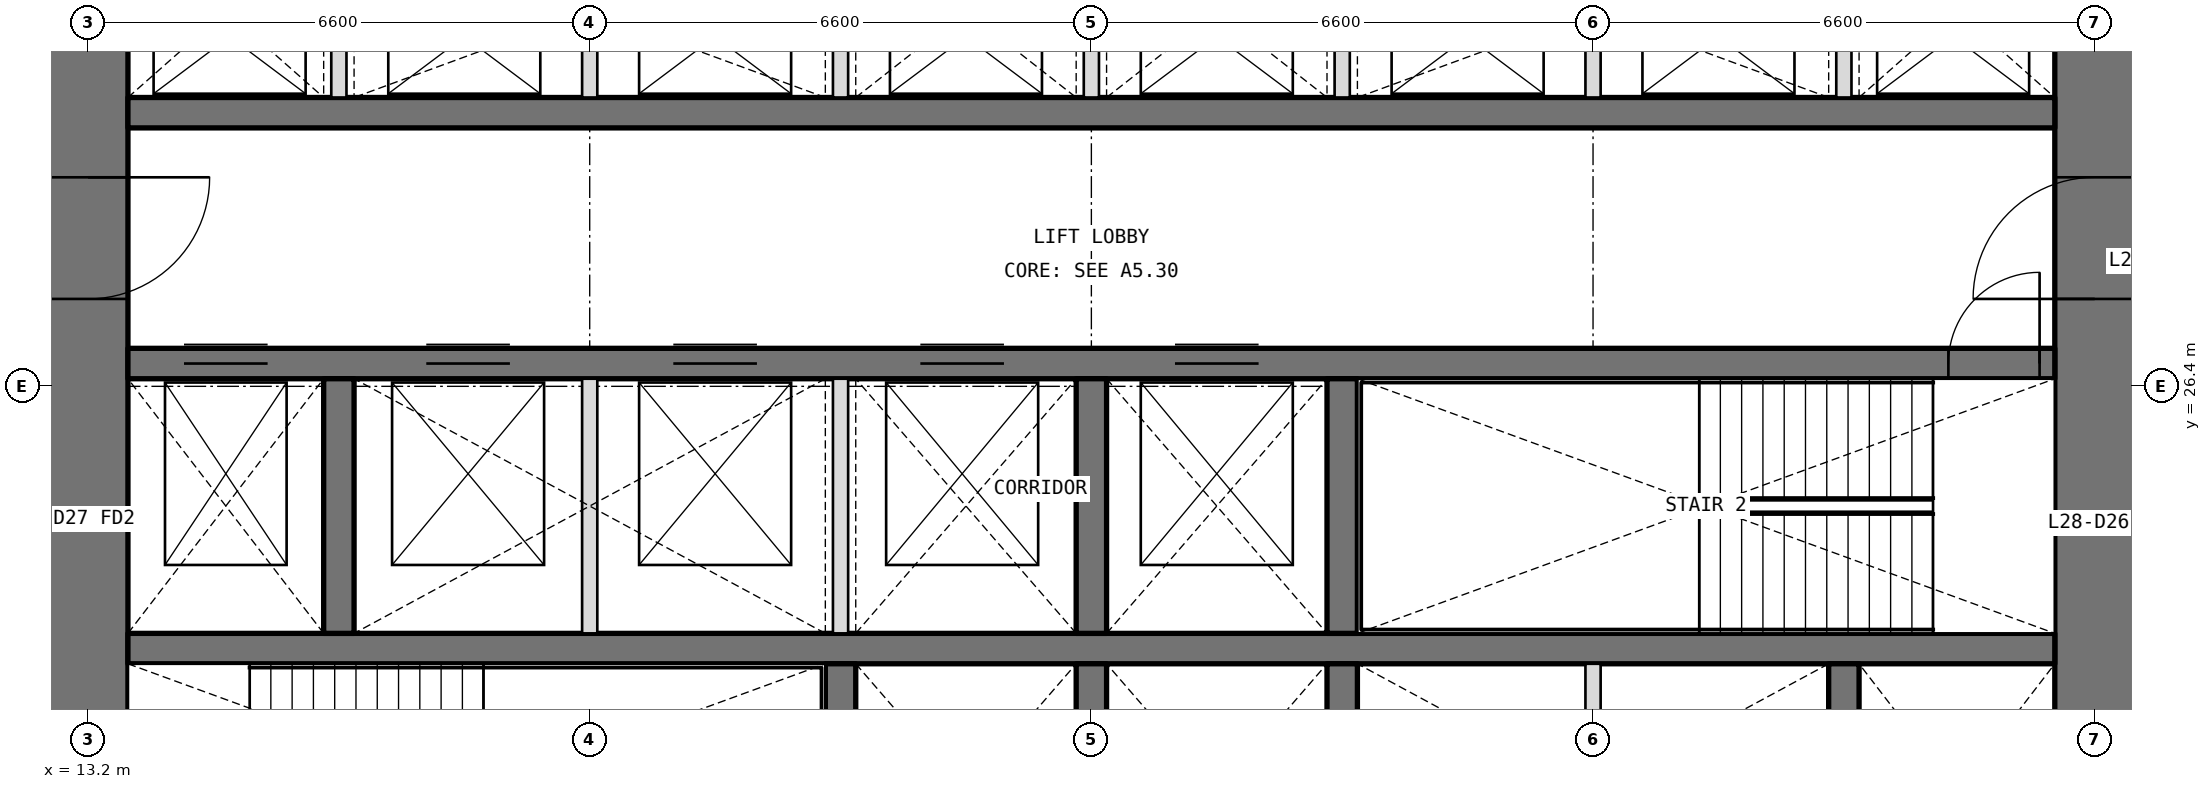
"""IFC4 building model, lengths in metres.
Left out: names, types, materials, properties, quantities, classifications, styles, units other than length and angle.
Written with IfcOpenShell. Run it as: python <this file> out.ifc"""

import sys

from ifc_helpers import new_model, si_unit, direction, frame, frame_2d, origin, place, context, subcontext, project, spatial, rectangle, extrude, element, fill, save


model = new_model("IFC4")
c1 = context("Model", 3, precision=1e-05, world=origin(), true_north=direction((0.0, 1.0)))
c2 = subcontext(c1, "Body", "Model", "MODEL_VIEW")
j1 = project(units=[si_unit("LENGTHUNIT", "METRE"), si_unit("PLANEANGLEUNIT", "RADIAN")], contexts=[c1])
p1 = place(None, origin())
s1 = spatial("IfcSite", under=j1, at=p1, CompositionType="ELEMENT")
p2 = place(p1, origin())
s2 = spatial("IfcBuilding", under=s1, at=p2, CompositionType="ELEMENT")
p3 = place(p2, frame((0.0, 0.0, 124.2)))
s3 = spatial("IfcBuildingStorey", under=s2, at=p3, CompositionType="ELEMENT", Elevation=124.2)
p4 = place(p3, frame((39.6, 13.725, 0.0), z_axis=(0.0, 0.0, 1.0), x_axis=(0.0, 1.0, 0.0)))
e1 = element("IfcWall", 1, at=p4, inside=s3, PredefinedType="SHEAR", context=c2, shape_type="SweptSolid", body=[
    extrude(rectangle(XDim=18.75, YDim=1.05, at=frame_2d((9.375, 0.0))), origin(), (0.0, 0.0, 1.0), 4.2),
])
p5 = place(p4, frame((3.025, 0.0, 0.0)))
e2 = element("IfcOpeningElement", 2, at=p5, cuts=e1, PredefinedType="OPENING", context=c2, shape_type="SweptSolid", body=[
    extrude(rectangle(XDim=1.6, YDim=2.1, at=frame_2d((0.8, 1.05))), frame((0.0, 0.535, 0.0), z_axis=(0.0, -1.0, 0.0), x_axis=(1.0, 0.0, 0.0)), (0.0, 0.0, 1.0), 1.07),
])
p6 = place(p4, frame((13.825, 0.0, 0.0)))
e3 = element("IfcOpeningElement", 3, at=p6, cuts=e1, PredefinedType="OPENING", context=c2, shape_type="SweptSolid", body=[
    extrude(rectangle(XDim=1.6, YDim=2.1, at=frame_2d((0.8, 1.05))), frame((0.0, 0.535, 0.0), z_axis=(0.0, -1.0, 0.0), x_axis=(1.0, 0.0, 0.0)), (0.0, 0.0, 1.0), 1.07),
])
p7 = place(p3, frame((13.2, 32.475, 0.0), z_axis=(0.0, 0.0, 1.0), x_axis=(0.0, -1.0, 0.0)))
e4 = element("IfcWall", 4, at=p7, inside=s3, PredefinedType="SHEAR", context=c2, shape_type="SweptSolid", body=[
    extrude(rectangle(XDim=18.75, YDim=1.05, at=frame_2d((9.375, 0.0))), origin(), (0.0, 0.0, 1.0), 4.2),
])
p8 = place(p7, frame((14.125, 0.0, 0.0)))
e5 = element("IfcOpeningElement", 5, at=p8, cuts=e4, PredefinedType="OPENING", context=c2, shape_type="SweptSolid", body=[
    extrude(rectangle(XDim=1.6, YDim=2.1, at=frame_2d((0.8, 1.05))), frame((0.0, 0.535, 0.0), z_axis=(0.0, -1.0, 0.0), x_axis=(1.0, 0.0, 0.0)), (0.0, 0.0, 1.0), 1.07),
])
p9 = place(p7, frame((3.325, 0.0, 0.0)))
e6 = element("IfcOpeningElement", 6, at=p9, cuts=e4, PredefinedType="OPENING", context=c2, shape_type="SweptSolid", body=[
    extrude(rectangle(XDim=1.6, YDim=2.1, at=frame_2d((0.8, 1.05))), frame((0.0, 0.535, 0.0), z_axis=(0.0, -1.0, 0.0), x_axis=(1.0, 0.0, 0.0)), (0.0, 0.0, 1.0), 1.07),
])
p10 = place(p3, frame((13.725, 22.95, 0.0), z_axis=(0.0, 0.0, 1.0), x_axis=(1.0, 0.0, 0.0)))
e7 = element("IfcWall", 7, at=p10, inside=s3, PredefinedType="SHEAR", context=c2, shape_type="SweptSolid", body=[
    extrude(rectangle(XDim=25.35, YDim=0.4, at=frame_2d((12.675, 0.0))), origin(), (0.0, 0.0, 1.0), 4.2),
])
p11 = place(p3, frame((13.725, 26.7, 0.0), z_axis=(0.0, 0.0, 1.0), x_axis=(1.0, 0.0, 0.0)))
e8 = element("IfcWall", 8, at=p11, inside=s3, PredefinedType="SHEAR", context=c2, shape_type="SweptSolid", body=[
    extrude(rectangle(XDim=25.35, YDim=0.4, at=frame_2d((12.675, 0.0))), origin(), (0.0, 0.0, 1.0), 4.2),
])
p12 = place(p11, frame((23.95, 0.0, 0.0)))
e9 = element("IfcOpeningElement", 9, at=p12, cuts=e8, PredefinedType="OPENING", context=c2, shape_type="SweptSolid", body=[
    extrude(rectangle(XDim=1.2, YDim=2.1, at=frame_2d((0.6, 1.05))), frame((0.0, 0.21, 0.0), z_axis=(0.0, -1.0, 0.0), x_axis=(1.0, 0.0, 0.0)), (0.0, 0.0, 1.0), 0.42),
])
p13 = place(p11, frame((0.738, 0.0, 0.0)))
e10 = element("IfcOpeningElement", 10, at=p13, cuts=e8, PredefinedType="OPENING", context=c2, shape_type="SweptSolid", body=[
    extrude(rectangle(XDim=1.1, YDim=2.1, at=frame_2d((0.55, 1.05))), frame((0.0, 0.21, 0.0), z_axis=(0.0, -1.0, 0.0), x_axis=(1.0, 0.0, 0.0)), (0.0, 0.0, 1.0), 0.42),
])
p14 = place(p11, frame((3.925, 0.0, 0.0)))
e11 = element("IfcOpeningElement", 11, at=p14, cuts=e8, PredefinedType="OPENING", context=c2, shape_type="SweptSolid", body=[
    extrude(rectangle(XDim=1.1, YDim=2.1, at=frame_2d((0.55, 1.05))), frame((0.0, 0.21, 0.0), z_axis=(0.0, -1.0, 0.0), x_axis=(1.0, 0.0, 0.0)), (0.0, 0.0, 1.0), 0.42),
])
p15 = place(p11, frame((7.175, 0.0, 0.0)))
e12 = element("IfcOpeningElement", 12, at=p15, cuts=e8, PredefinedType="OPENING", context=c2, shape_type="SweptSolid", body=[
    extrude(rectangle(XDim=1.1, YDim=2.1, at=frame_2d((0.55, 1.05))), frame((0.0, 0.21, 0.0), z_axis=(0.0, -1.0, 0.0), x_axis=(1.0, 0.0, 0.0)), (0.0, 0.0, 1.0), 0.42),
])
p16 = place(p11, frame((10.425, 0.0, 0.0)))
e13 = element("IfcOpeningElement", 13, at=p16, cuts=e8, PredefinedType="OPENING", context=c2, shape_type="SweptSolid", body=[
    extrude(rectangle(XDim=1.1, YDim=2.1, at=frame_2d((0.55, 1.05))), frame((0.0, 0.21, 0.0), z_axis=(0.0, -1.0, 0.0), x_axis=(1.0, 0.0, 0.0)), (0.0, 0.0, 1.0), 0.42),
])
p17 = place(p11, frame((13.775, 0.0, 0.0)))
e14 = element("IfcOpeningElement", 14, at=p17, cuts=e8, PredefinedType="OPENING", context=c2, shape_type="SweptSolid", body=[
    extrude(rectangle(XDim=1.1, YDim=2.1, at=frame_2d((0.55, 1.05))), frame((0.0, 0.21, 0.0), z_axis=(0.0, -1.0, 0.0), x_axis=(1.0, 0.0, 0.0)), (0.0, 0.0, 1.0), 0.42),
])
p18 = place(p3, frame((13.725, 30.0, 0.0), z_axis=(0.0, 0.0, 1.0), x_axis=(1.0, 0.0, 0.0)))
e15 = element("IfcWall", 15, at=p18, inside=s3, PredefinedType="SHEAR", context=c2, shape_type="SweptSolid", body=[
    extrude(rectangle(XDim=25.35, YDim=0.4, at=frame_2d((12.675, 0.0))), origin(), (0.0, 0.0, 1.0), 4.2),
])
for number, where, z_axis, x_axis in (
    (16, (23.1, 19.4, 0.0), (0.0, 0.0, 1.0), (0.0, 1.0, 0.0)),
    (17, (26.4, 19.4, 0.0), (0.0, 0.0, 1.0), (0.0, 1.0, 0.0)),
    (18, (29.7, 19.4, 0.0), (0.0, 0.0, 1.0), (0.0, 1.0, 0.0)),
    (19, (36.3, 19.4, 0.0), (0.0, 0.0, 1.0), (0.0, 1.0, 0.0)),
    (20, (16.5, 23.15, 0.0), (0.0, 0.0, 1.0), (0.0, 1.0, 0.0)),
    (21, (26.4, 23.15, 0.0), (0.0, 0.0, 1.0), (0.0, 1.0, 0.0)),
    (22, (29.7, 23.15, 0.0), (0.0, 0.0, 1.0), (0.0, 1.0, 0.0)),
):
    element("IfcWall", number, at=place(p3, frame(where, z_axis=z_axis, x_axis=x_axis)), inside=s3, PredefinedType="SHEAR", context=c2, shape_type="SweptSolid", body=[
        extrude(rectangle(XDim=3.35, YDim=0.4, at=frame_2d((1.675, 0.0))), origin(), (0.0, 0.0, 1.0), 4.2),
    ])
for number, where, z_axis, x_axis in (
    (23, (16.5, 30.2, 0.0), (0.0, 0.0, 1.0), (0.0, 1.0, 0.0)),
    (24, (19.8, 30.2, 0.0), (0.0, 0.0, 1.0), (0.0, 1.0, 0.0)),
    (25, (23.1, 30.2, 0.0), (0.0, 0.0, 1.0), (0.0, 1.0, 0.0)),
    (26, (26.4, 30.2, 0.0), (0.0, 0.0, 1.0), (0.0, 1.0, 0.0)),
    (27, (29.7, 30.2, 0.0), (0.0, 0.0, 1.0), (0.0, 1.0, 0.0)),
    (28, (33.0, 30.2, 0.0), (0.0, 0.0, 1.0), (0.0, 1.0, 0.0)),
    (29, (36.3, 30.2, 0.0), (0.0, 0.0, 1.0), (0.0, 1.0, 0.0)),
):
    element("IfcWall", number, at=place(p3, frame(where, z_axis=z_axis, x_axis=x_axis)), inside=s3, PredefinedType="PARTITIONING", context=c2, shape_type="SweptSolid", body=[
        extrude(rectangle(XDim=2.275, YDim=0.2, at=frame_2d((1.138, 0.0))), origin(), (0.0, 0.0, 1.0), 4.2),
    ])
for number, where, z_axis, x_axis in (
    (30, (33.0, 19.4, 0.0), (0.0, 0.0, 1.0), (0.0, 1.0, 0.0)),
    (31, (19.8, 23.15, 0.0), (0.0, 0.0, 1.0), (0.0, 1.0, 0.0)),
    (32, (23.1, 23.15, 0.0), (0.0, 0.0, 1.0), (0.0, 1.0, 0.0)),
):
    element("IfcWall", number, at=place(p3, frame(where, z_axis=z_axis, x_axis=x_axis)), inside=s3, PredefinedType="PARTITIONING", context=c2, shape_type="SweptSolid", body=[
        extrude(rectangle(XDim=3.35, YDim=0.2, at=frame_2d((1.675, 0.0))), origin(), (0.0, 0.0, 1.0), 4.2),
    ])
p19 = place(p12, origin())
e33 = element("IfcDoor", 33, at=p19, inside=s3, OperationType="SINGLE_SWING_RIGHT", PredefinedType="DOOR", context=c2, shape_type="SweptSolid", body=[
    extrude(rectangle(XDim=1.2, YDim=2.1, at=frame_2d((0.6, 1.05))), frame((0.0, 0.025, 0.0), z_axis=(0.0, -1.0, 0.0), x_axis=(1.0, 0.0, 0.0)), (0.0, 0.0, 1.0), 0.05),
])
fill(e9, e33)
p20 = place(p9, origin())
e34 = element("IfcDoor", 34, at=p20, inside=s3, OperationType="DOUBLE_DOOR_DOUBLE_SWING", PredefinedType="DOOR", context=c2, shape_type="SweptSolid", body=[
    extrude(rectangle(XDim=1.6, YDim=2.1, at=frame_2d((0.8, 1.05))), frame((0.0, 0.025, 0.0), z_axis=(0.0, -1.0, 0.0), x_axis=(1.0, 0.0, 0.0)), (0.0, 0.0, 1.0), 0.05),
])
fill(e6, e34)
p21 = place(p6, origin())
e35 = element("IfcDoor", 35, at=p21, inside=s3, OperationType="DOUBLE_DOOR_DOUBLE_SWING", PredefinedType="DOOR", context=c2, shape_type="SweptSolid", body=[
    extrude(rectangle(XDim=1.6, YDim=2.1, at=frame_2d((0.8, 1.05))), frame((0.0, 0.025, 0.0), z_axis=(0.0, -1.0, 0.0), x_axis=(1.0, 0.0, 0.0)), (0.0, 0.0, 1.0), 0.05),
])
fill(e3, e35)
p22 = place(p13, origin())
e36 = element("IfcDoor", 36, at=p22, inside=s3, OperationType="DOUBLE_DOOR_SLIDING", PredefinedType="DOOR", context=c2, shape_type="SweptSolid", body=[
    extrude(rectangle(XDim=1.1, YDim=2.1, at=frame_2d((0.55, 1.05))), frame((0.0, 0.025, 0.0), z_axis=(0.0, -1.0, 0.0), x_axis=(1.0, 0.0, 0.0)), (0.0, 0.0, 1.0), 0.05),
])
fill(e10, e36)
p23 = place(p14, origin())
e37 = element("IfcDoor", 37, at=p23, inside=s3, OperationType="DOUBLE_DOOR_SLIDING", PredefinedType="DOOR", context=c2, shape_type="SweptSolid", body=[
    extrude(rectangle(XDim=1.1, YDim=2.1, at=frame_2d((0.55, 1.05))), frame((0.0, 0.025, 0.0), z_axis=(0.0, -1.0, 0.0), x_axis=(1.0, 0.0, 0.0)), (0.0, 0.0, 1.0), 0.05),
])
fill(e11, e37)
p24 = place(p15, origin())
e38 = element("IfcDoor", 38, at=p24, inside=s3, OperationType="DOUBLE_DOOR_SLIDING", PredefinedType="DOOR", context=c2, shape_type="SweptSolid", body=[
    extrude(rectangle(XDim=1.1, YDim=2.1, at=frame_2d((0.55, 1.05))), frame((0.0, 0.025, 0.0), z_axis=(0.0, -1.0, 0.0), x_axis=(1.0, 0.0, 0.0)), (0.0, 0.0, 1.0), 0.05),
])
fill(e12, e38)
p25 = place(p16, origin())
e39 = element("IfcDoor", 39, at=p25, inside=s3, OperationType="DOUBLE_DOOR_SLIDING", PredefinedType="DOOR", context=c2, shape_type="SweptSolid", body=[
    extrude(rectangle(XDim=1.1, YDim=2.1, at=frame_2d((0.55, 1.05))), frame((0.0, 0.025, 0.0), z_axis=(0.0, -1.0, 0.0), x_axis=(1.0, 0.0, 0.0)), (0.0, 0.0, 1.0), 0.05),
])
fill(e13, e39)
p26 = place(p17, origin())
e40 = element("IfcDoor", 40, at=p26, inside=s3, OperationType="DOUBLE_DOOR_SLIDING", PredefinedType="DOOR", context=c2, shape_type="SweptSolid", body=[
    extrude(rectangle(XDim=1.1, YDim=2.1, at=frame_2d((0.55, 1.05))), frame((0.0, 0.025, 0.0), z_axis=(0.0, -1.0, 0.0), x_axis=(1.0, 0.0, 0.0)), (0.0, 0.0, 1.0), 0.05),
])
fill(e14, e40)
save(model, sys.argv[1])
